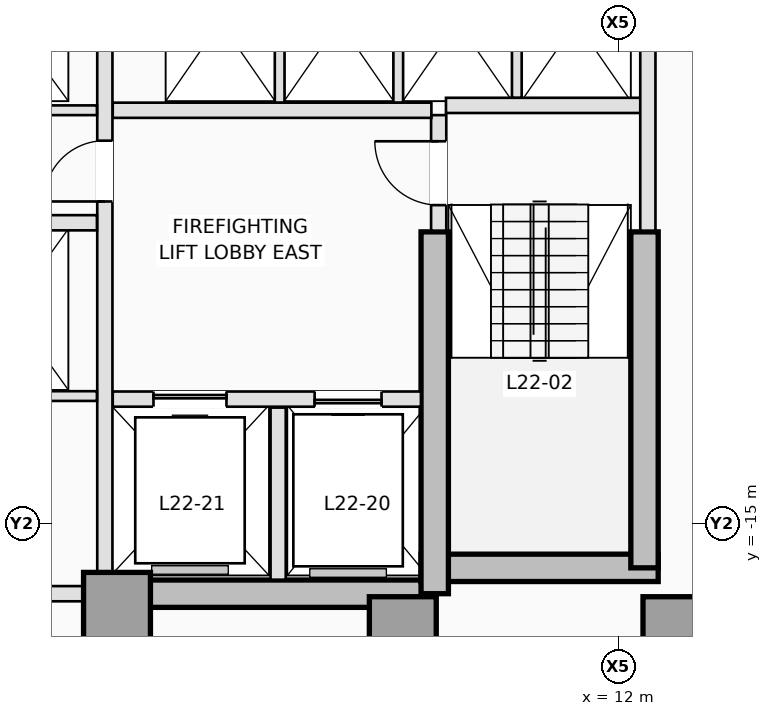
"""IFC4 building model, lengths in metres.
Left out: names, types, materials, properties, quantities, classifications, styles, units other than length and angle.
Written with IfcOpenShell. Run it as: python <this file> out.ifc"""

import sys

from ifc_helpers import new_model, si_unit, direction, frame, frame_2d, origin, origin_2d, place, context, subcontext, project, spatial, rectangle, extrude, element, fill, save


model = new_model("IFC4")
c1 = context("Model", 3, precision=1e-05, world=origin(), true_north=direction((0.0, 1.0)))
c2 = subcontext(c1, "Body", "Model", "MODEL_VIEW")
j1 = project(units=[si_unit("LENGTHUNIT", "METRE"), si_unit("PLANEANGLEUNIT", "RADIAN")], contexts=[c1])
p1 = place(None, origin())
s1 = spatial("IfcSite", under=j1, at=p1, CompositionType="ELEMENT")
p2 = place(p1, origin())
s2 = spatial("IfcBuilding", under=s1, at=p2, CompositionType="ELEMENT")
p3 = place(p2, frame((0.0, 0.0, 83.6)))
s3 = spatial("IfcBuildingStorey", under=s2, at=p3, CompositionType="ELEMENT", Elevation=83.6)
p4 = place(p3, frame((3.75, -16.15, 0.0), z_axis=(0.0, 0.0, 1.0), x_axis=(1.0, 0.0, 0.0)))
e1 = element("IfcWall", 1, at=p4, inside=s3, PredefinedType="SHEAR", context=c2, shape_type="SweptSolid", body=[
    extrude(rectangle(XDim=5.225, YDim=0.45, at=frame_2d((2.613, 0.0))), origin(), (0.0, 0.0, 1.0), 3.5),
])
p5 = place(p3, frame((8.75, -15.725, 0.0), z_axis=(0.0, 0.0, 1.0), x_axis=(1.0, 0.0, 0.0)))
e2 = element("IfcWall", 2, at=p5, inside=s3, PredefinedType="SHEAR", context=c2, shape_type="SweptSolid", body=[
    extrude(rectangle(XDim=3.9, YDim=0.45, at=frame_2d((1.95, 0.0))), origin(), (0.0, 0.0, 1.0), 3.5),
])
p6 = place(p3, frame((12.425, -15.725, 0.0), z_axis=(0.0, 0.0, 1.0), x_axis=(0.0, 1.0, 0.0)))
e3 = element("IfcWall", 3, at=p6, inside=s3, PredefinedType="SHEAR", context=c2, shape_type="SweptSolid", body=[
    extrude(rectangle(XDim=5.525, YDim=0.45, at=frame_2d((2.763, 0.0))), origin(), (0.0, 0.0, 1.0), 3.5),
])
p7 = place(p3, frame((8.975, -16.15, 0.0), z_axis=(0.0, 0.0, 1.0), x_axis=(0.0, 1.0, 0.0)))
e4 = element("IfcWall", 4, at=p7, inside=s3, PredefinedType="SHEAR", context=c2, shape_type="SweptSolid", body=[
    extrude(rectangle(XDim=5.95, YDim=0.45, at=frame_2d((2.975, 0.0))), origin(), (0.0, 0.0, 1.0), 3.5),
])
for number, where, z_axis, x_axis in (
    (5, (3.75, -16.35, 0.0), (0.0, 0.0, 1.0), (1.0, 0.0, 0.0)),
    (6, (8.45, -16.75, 0.0), (0.0, 0.0, 1.0), (1.0, 0.0, 0.0)),
    (7, (12.95, -16.75, 0.0), (0.0, 0.0, 1.0), (1.0, 0.0, 0.0)),
):
    element("IfcColumn", number, at=place(p3, frame(where, z_axis=z_axis, x_axis=x_axis)), inside=s3, PredefinedType="COLUMN", context=c2, shape_type="SweptSolid", body=[
        extrude(rectangle(XDim=1.1, YDim=1.1, at=origin_2d()), origin(), (0.0, 0.0, 1.0), 3.5),
    ])
p8 = place(p3, frame((9.04, -10.18, 0.0), z_axis=(0.0, 0.0, 1.0), x_axis=(0.0, 1.0, 0.0)))
e8 = element("IfcWall", 8, at=p8, inside=s3, PredefinedType="PARTITIONING", context=c2, shape_type="SweptSolid", body=[
    extrude(rectangle(XDim=1.9, YDim=0.25, at=frame_2d((0.95, 0.0))), origin(), (0.0, 0.0, 1.0), 3.25),
])
p9 = place(p8, frame((0.42, 0.0, 0.0)))
e9 = element("IfcOpeningElement", 9, at=p9, cuts=e8, PredefinedType="OPENING", context=c2, shape_type="SweptSolid", body=[
    extrude(rectangle(XDim=1.05, YDim=2.15, at=frame_2d((0.525, 1.075))), frame((0.0, 0.135, 0.0), z_axis=(0.0, -1.0, 0.0), x_axis=(1.0, 0.0, 0.0)), (0.0, 0.0, 1.0), 0.27),
])
p10 = place(p3, frame((9.16, -8.12, 0.0), z_axis=(0.0, 0.0, 1.0), x_axis=(1.0, 0.0, 0.0)))
e10 = element("IfcWall", 10, at=p10, inside=s3, PredefinedType="PARTITIONING", context=c2, shape_type="SweptSolid", body=[
    extrude(rectangle(XDim=3.22, YDim=0.25, at=frame_2d((1.61, 0.0))), origin(), (0.0, 0.0, 1.0), 3.25),
])
p11 = place(p3, frame((12.48, -10.18, 0.0), z_axis=(0.0, 0.0, 1.0), x_axis=(0.0, 1.0, 0.0)))
e11 = element("IfcWall", 11, at=p11, inside=s3, PredefinedType="PARTITIONING", context=c2, shape_type="SweptSolid", body=[
    extrude(rectangle(XDim=4.828, YDim=0.25, at=frame_2d((2.414, 0.0))), origin(), (0.0, 0.0, 1.0), 3.25),
])
p12 = place(p3, frame((3.68, -12.95, 0.0), z_axis=(0.0, 0.0, 1.0), x_axis=(1.0, 0.0, 0.0)))
e12 = element("IfcWall", 12, at=p12, inside=s3, PredefinedType="PARTITIONING", context=c2, shape_type="SweptSolid", body=[
    extrude(rectangle(XDim=5.068, YDim=0.25, at=frame_2d((2.534, 0.0))), origin(), (0.0, 0.0, 1.0), 3.25),
])
p13 = place(p12, frame((3.32, 0.0, 0.0)))
e13 = element("IfcOpeningElement", 13, at=p13, cuts=e12, PredefinedType="OPENING", context=c2, shape_type="SweptSolid", body=[
    extrude(rectangle(XDim=1.1, YDim=2.15, at=frame_2d((0.55, 1.075))), frame((0.0, 0.135, 0.0), z_axis=(0.0, -1.0, 0.0), x_axis=(1.0, 0.0, 0.0)), (0.0, 0.0, 1.0), 0.27),
])
p14 = place(p12, frame((0.67, 0.0, 0.0)))
e14 = element("IfcOpeningElement", 14, at=p14, cuts=e12, PredefinedType="OPENING", context=c2, shape_type="SweptSolid", body=[
    extrude(rectangle(XDim=1.2, YDim=2.15, at=frame_2d((0.6, 1.075))), frame((0.0, 0.135, 0.0), z_axis=(0.0, -1.0, 0.0), x_axis=(1.0, 0.0, 0.0)), (0.0, 0.0, 1.0), 0.27),
])
p15 = place(p3, frame((6.4, -15.92, 0.0), z_axis=(0.0, 0.0, 1.0), x_axis=(0.0, 1.0, 0.0)))
e15 = element("IfcWall", 15, at=p15, inside=s3, PredefinedType="PARTITIONING", context=c2, shape_type="SweptSolid", body=[
    extrude(rectangle(XDim=2.83, YDim=0.25, at=frame_2d((1.415, 0.0))), origin(), (0.0, 0.0, 1.0), 3.25),
])
p16 = place(p3, frame((3.68, -8.2, 0.0), z_axis=(0.0, 0.0, 1.0), x_axis=(1.0, 0.0, 0.0)))
e16 = element("IfcWall", 16, at=p16, inside=s3, PredefinedType="PARTITIONING", context=c2, shape_type="SweptSolid", body=[
    extrude(rectangle(XDim=5.24, YDim=0.25, at=frame_2d((2.62, 0.0))), origin(), (0.0, 0.0, 1.0), 3.25),
])
p17 = place(p3, frame((3.55, -15.798, 0.0), z_axis=(0.0, 0.0, 1.0), x_axis=(0.0, 1.0, 0.0)))
e17 = element("IfcWall", 17, at=p17, inside=s3, PredefinedType="PARTITIONING", context=c2, shape_type="SweptSolid", body=[
    extrude(rectangle(XDim=10.446, YDim=0.25, at=frame_2d((5.223, 0.0))), origin(), (0.0, 0.0, 1.0), 3.25),
])
p18 = place(p17, frame((6.098, 0.0, 0.0)))
e18 = element("IfcOpeningElement", 18, at=p18, cuts=e17, PredefinedType="OPENING", context=c2, shape_type="SweptSolid", body=[
    extrude(rectangle(XDim=1.0, YDim=2.15, at=frame_2d((0.5, 1.075))), frame((0.0, 0.135, 0.0), z_axis=(0.0, -1.0, 0.0), x_axis=(1.0, 0.0, 0.0)), (0.0, 0.0, 1.0), 0.27),
])
for number, where, z_axis, x_axis in (
    (19, (6.425, -8.073, 0.0), (0.0, 0.0, 1.0), (0.0, 1.0, 0.0)),
    (20, (8.375, -8.073, 0.0), (0.0, 0.0, 1.0), (0.0, 1.0, 0.0)),
):
    element("IfcWall", number, at=place(p3, frame(where, z_axis=z_axis, x_axis=x_axis)), inside=s3, PredefinedType="PARTITIONING", context=c2, shape_type="SweptSolid", body=[
        extrude(rectangle(XDim=2.733, YDim=0.16, at=frame_2d((1.366, 0.0))), origin(), (0.0, 0.0, 1.0), 3.25),
    ])
p19 = place(p3, frame((10.325, -7.993, 0.0), z_axis=(0.0, 0.0, 1.0), x_axis=(0.0, 1.0, 0.0)))
e21 = element("IfcWall", 21, at=p19, inside=s3, PredefinedType="PARTITIONING", context=c2, shape_type="SweptSolid", body=[
    extrude(rectangle(XDim=2.653, YDim=0.16, at=frame_2d((1.326, 0.0))), origin(), (0.0, 0.0, 1.0), 3.25),
])
p20 = place(p3, frame((-3.198, -16.15, 0.0), z_axis=(0.0, 0.0, 1.0), x_axis=(1.0, 0.0, 0.0)))
e22 = element("IfcWall", 22, at=p20, inside=s3, PredefinedType="PARTITIONING", context=c2, shape_type="SweptSolid", body=[
    extrude(rectangle(XDim=6.396, YDim=0.25, at=frame_2d((3.198, 0.0))), origin(), (0.0, 0.0, 1.0), 2.3),
])
p21 = place(p3, frame((0.95, -8.2, 0.0), z_axis=(0.0, 0.0, 1.0), x_axis=(1.0, 0.0, 0.0)))
e23 = element("IfcWall", 23, at=p21, inside=s3, PredefinedType="PARTITIONING", context=c2, shape_type="SweptSolid", body=[
    extrude(rectangle(XDim=2.47, YDim=0.16, at=frame_2d((1.235, 0.0))), origin(), (0.0, 0.0, 1.0), 3.25),
])
p22 = place(p3, frame((0.95, -10.05, 0.0), z_axis=(0.0, 0.0, 1.0), x_axis=(1.0, 0.0, 0.0)))
e24 = element("IfcWall", 24, at=p22, inside=s3, PredefinedType="PARTITIONING", context=c2, shape_type="SweptSolid", body=[
    extrude(rectangle(XDim=2.47, YDim=0.25, at=frame_2d((1.235, 0.0))), origin(), (0.0, 0.0, 1.0), 3.25),
])
p23 = place(p3, frame((-3.42, -12.9, 0.0), z_axis=(0.0, 0.0, 1.0), x_axis=(1.0, 0.0, 0.0)))
e25 = element("IfcWall", 25, at=p23, inside=s3, PredefinedType="PARTITIONING", context=c2, shape_type="SweptSolid", body=[
    extrude(rectangle(XDim=6.84, YDim=0.16, at=frame_2d((3.42, 0.0))), origin(), (0.0, 0.0, 1.0), 3.25),
])
p24 = place(p23, frame((2.98, 0.0, 0.0)))
e26 = element("IfcOpeningElement", 26, at=p24, cuts=e25, PredefinedType="OPENING", context=c2, shape_type="SweptSolid", body=[
    extrude(rectangle(XDim=0.88, YDim=2.12, at=frame_2d((0.44, 1.06))), frame((0.0, 0.09, 0.0), z_axis=(0.0, -1.0, 0.0), x_axis=(1.0, 0.0, 0.0)), (0.0, 0.0, 1.0), 0.18),
])
p25 = place(p13, origin())
e27 = element("IfcDoor", 27, at=p25, inside=s3, OperationType="SLIDING_TO_RIGHT", PredefinedType="DOOR", context=c2, shape_type="SweptSolid", body=[
    extrude(rectangle(XDim=1.1, YDim=2.15, at=frame_2d((0.55, 1.075))), frame((0.0, 0.025, 0.0), z_axis=(0.0, -1.0, 0.0), x_axis=(1.0, 0.0, 0.0)), (0.0, 0.0, 1.0), 0.05),
])
fill(e13, e27)
p26 = place(p14, origin())
e28 = element("IfcDoor", 28, at=p26, inside=s3, OperationType="SLIDING_TO_LEFT", PredefinedType="DOOR", context=c2, shape_type="SweptSolid", body=[
    extrude(rectangle(XDim=1.2, YDim=2.15, at=frame_2d((0.6, 1.075))), frame((0.0, 0.025, 0.0), z_axis=(0.0, -1.0, 0.0), x_axis=(1.0, 0.0, 0.0)), (0.0, 0.0, 1.0), 0.05),
])
fill(e14, e28)
p27 = place(p9, origin())
e29 = element("IfcDoor", 29, at=p27, inside=s3, OperationType="SINGLE_SWING_RIGHT", PredefinedType="DOOR", context=c2, shape_type="SweptSolid", body=[
    extrude(rectangle(XDim=1.05, YDim=2.15, at=frame_2d((0.525, 1.075))), frame((0.0, 0.025, 0.0), z_axis=(0.0, -1.0, 0.0), x_axis=(1.0, 0.0, 0.0)), (0.0, 0.0, 1.0), 0.05),
])
fill(e9, e29)
p28 = place(p18, origin())
e30 = element("IfcDoor", 30, at=p28, inside=s3, OperationType="SINGLE_SWING_LEFT", PredefinedType="DOOR", context=c2, shape_type="SweptSolid", body=[
    extrude(rectangle(XDim=1.0, YDim=2.15, at=frame_2d((0.5, 1.075))), frame((0.0, 0.025, 0.0), z_axis=(0.0, -1.0, 0.0), x_axis=(1.0, 0.0, 0.0)), (0.0, 0.0, 1.0), 0.05),
])
fill(e18, e30)
save(model, sys.argv[1])
